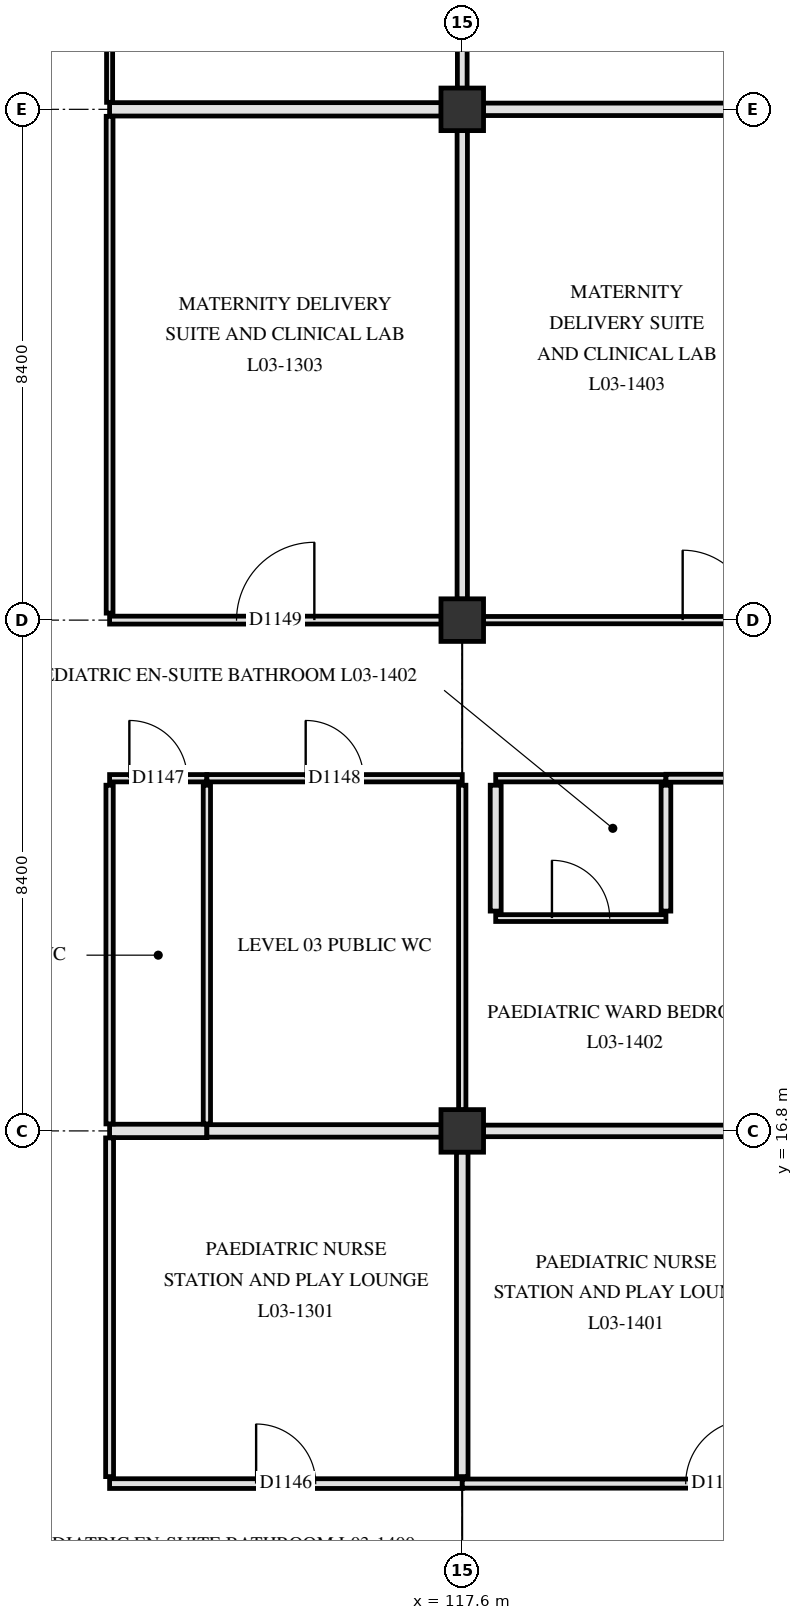
"""IFC4 building model, lengths in metres.
Left out: names, types, materials, properties, quantities, classifications, styles, units other than length and angle.
Written with IfcOpenShell. Run it as: python <this file> out.ifc"""

import sys

from ifc_helpers import new_model, si_unit, direction, frame, frame_2d, origin, origin_2d, place, context, subcontext, project, spatial, rectangle, extrude, element, fill, save


model = new_model("IFC4")
c1 = context("Model", 3, precision=1e-05, world=origin(), true_north=direction((0.0, 1.0)))
c2 = subcontext(c1, "Body", "Model", "MODEL_VIEW")
j1 = project(units=[si_unit("LENGTHUNIT", "METRE"), si_unit("PLANEANGLEUNIT", "RADIAN")], contexts=[c1])
p1 = place(None, origin())
s1 = spatial("IfcSite", under=j1, at=p1, CompositionType="ELEMENT")
p2 = place(p1, origin())
s2 = spatial("IfcBuilding", under=s1, at=p2, CompositionType="ELEMENT")
p3 = place(p2, frame((0.0, 0.0, 14.4)))
s3 = spatial("IfcBuildingStorey", under=s2, at=p3, CompositionType="ELEMENT", Elevation=14.4)
for number, where, z_axis, x_axis in (
    (1, (117.6, 16.8, 0.0), (0.0, 0.0, 1.0), (1.0, 0.0, 0.0)),
    (2, (117.6, 25.2, 0.0), (0.0, 0.0, 1.0), (1.0, 0.0, 0.0)),
    (3, (117.6, 33.6, 0.0), (0.0, 0.0, 1.0), (1.0, 0.0, 0.0)),
):
    element("IfcColumn", number, at=place(p3, frame(where, z_axis=z_axis, x_axis=x_axis)), inside=s3, PredefinedType="COLUMN", context=c2, shape_type="SweptSolid", body=[
        extrude(rectangle(XDim=0.7, YDim=0.7, at=origin_2d()), origin(), (0.0, 0.0, 1.0), 4.2),
    ])
p4 = place(p3, frame((111.8, 11.0, 0.0), z_axis=(0.0, 0.0, 1.0), x_axis=(1.0, 0.0, 0.0)))
e4 = element("IfcWall", 4, at=p4, inside=s3, PredefinedType="PARTITIONING", context=c2, shape_type="SweptSolid", body=[
    extrude(rectangle(XDim=5.8, YDim=0.16, at=frame_2d((2.9, 0.0))), origin(), (0.0, 0.0, 1.0), 3.34),
])
p5 = place(p4, frame((2.41, 0.0, 0.0)))
e5 = element("IfcOpeningElement", 5, at=p5, cuts=e4, PredefinedType="OPENING", context=c2, shape_type="SweptSolid", body=[
    extrude(rectangle(XDim=0.98, YDim=2.12, at=frame_2d((0.49, 1.06))), frame((0.0, 0.09, 0.0), z_axis=(0.0, -1.0, 0.0), x_axis=(1.0, 0.0, 0.0)), (0.0, 0.0, 1.0), 0.18),
])
p6 = place(p3, frame((117.6, 11.0, 0.0), z_axis=(0.0, 0.0, 1.0), x_axis=(1.0, 0.0, 0.0)))
e6 = element("IfcWall", 6, at=p6, inside=s3, PredefinedType="PARTITIONING", context=c2, shape_type="SweptSolid", body=[
    extrude(rectangle(XDim=8.4, YDim=0.15, at=frame_2d((4.2, 0.0))), origin(), (0.0, 0.0, 1.0), 2.69),
])
p7 = place(p6, frame((3.675, 0.0, 0.0)))
e7 = element("IfcOpeningElement", 7, at=p7, cuts=e6, PredefinedType="OPENING", context=c2, shape_type="SweptSolid", body=[
    extrude(rectangle(XDim=1.05, YDim=2.15, at=frame_2d((0.525, 1.075))), frame((0.0, 0.085, 0.0), z_axis=(0.0, -1.0, 0.0), x_axis=(1.0, 0.0, 0.0)), (0.0, 0.0, 1.0), 0.17),
])
p8 = place(p3, frame((111.8, 16.8, 0.0), z_axis=(0.0, 0.0, 1.0), x_axis=(1.0, 0.0, 0.0)))
e8 = element("IfcWall", 8, at=p8, inside=s3, PredefinedType="PARTITIONING", context=c2, shape_type="SweptSolid", body=[
    extrude(rectangle(XDim=1.6, YDim=0.22, at=frame_2d((0.8, 0.0))), origin(), (0.0, 0.0, 1.0), 3.29),
])
p9 = place(p3, frame((113.4, 16.8, 0.0), z_axis=(0.0, 0.0, 1.0), x_axis=(1.0, 0.0, 0.0)))
e9 = element("IfcWall", 9, at=p9, inside=s3, PredefinedType="PARTITIONING", context=c2, shape_type="SweptSolid", body=[
    extrude(rectangle(XDim=3.855, YDim=0.205, at=frame_2d((1.927, 0.0))), origin(), (0.0, 0.0, 1.0), 3.29),
])
p10 = place(p3, frame((117.945, 16.8, 0.0), z_axis=(0.0, 0.0, 1.0), x_axis=(1.0, 0.0, 0.0)))
e10 = element("IfcWall", 10, at=p10, inside=s3, PredefinedType="PARTITIONING", context=c2, shape_type="SweptSolid", body=[
    extrude(rectangle(XDim=7.71, YDim=0.19, at=frame_2d((3.855, 0.0))), origin(), (0.0, 0.0, 1.0), 3.29),
])
p11 = place(p3, frame((118.15, 20.3, 0.0), z_axis=(0.0, 0.0, 1.0), x_axis=(1.0, 0.0, 0.0)))
e11 = element("IfcWall", 11, at=p11, inside=s3, PredefinedType="PARTITIONING", context=c2, shape_type="SweptSolid", body=[
    extrude(rectangle(XDim=2.8, YDim=0.112, at=frame_2d((1.4, 0.0))), origin(), (0.0, 0.0, 1.0), 3.89),
])
p12 = place(p11, frame((0.925, 0.0, 0.0)))
e12 = element("IfcOpeningElement", 12, at=p12, cuts=e11, PredefinedType="OPENING", context=c2, shape_type="SweptSolid", body=[
    extrude(rectangle(XDim=0.95, YDim=2.1, at=frame_2d((0.475, 1.05))), frame((0.0, 0.066, 0.0), z_axis=(0.0, -1.0, 0.0), x_axis=(1.0, 0.0, 0.0)), (0.0, 0.0, 1.0), 0.132),
])
p13 = place(p3, frame((111.8, 22.6, 0.0), z_axis=(0.0, 0.0, 1.0), x_axis=(1.0, 0.0, 0.0)))
e13 = element("IfcWall", 13, at=p13, inside=s3, PredefinedType="PARTITIONING", context=c2, shape_type="SweptSolid", body=[
    extrude(rectangle(XDim=1.6, YDim=0.12, at=frame_2d((0.8, 0.0))), origin(), (0.0, 0.0, 1.0), 3.89),
])
p14 = place(p13, frame((0.325, 0.0, 0.0)))
e14 = element("IfcOpeningElement", 14, at=p14, cuts=e13, PredefinedType="OPENING", context=c2, shape_type="SweptSolid", body=[
    extrude(rectangle(XDim=0.95, YDim=2.1, at=frame_2d((0.475, 1.05))), frame((0.0, 0.07, 0.0), z_axis=(0.0, -1.0, 0.0), x_axis=(1.0, 0.0, 0.0)), (0.0, 0.0, 1.0), 0.14),
])
p15 = place(p3, frame((113.4, 22.6, 0.0), z_axis=(0.0, 0.0, 1.0), x_axis=(1.0, 0.0, 0.0)))
e15 = element("IfcWall", 15, at=p15, inside=s3, PredefinedType="PARTITIONING", context=c2, shape_type="SweptSolid", body=[
    extrude(rectangle(XDim=4.2, YDim=0.12, at=frame_2d((2.1, 0.0))), origin(), (0.0, 0.0, 1.0), 3.34),
])
p16 = place(p15, frame((1.625, 0.0, 0.0)))
e16 = element("IfcOpeningElement", 16, at=p16, cuts=e15, PredefinedType="OPENING", context=c2, shape_type="SweptSolid", body=[
    extrude(rectangle(XDim=0.95, YDim=2.1, at=frame_2d((0.475, 1.05))), frame((0.0, 0.07, 0.0), z_axis=(0.0, -1.0, 0.0), x_axis=(1.0, 0.0, 0.0)), (0.0, 0.0, 1.0), 0.14),
])
p17 = place(p3, frame((118.15, 22.6, 0.0), z_axis=(0.0, 0.0, 1.0), x_axis=(1.0, 0.0, 0.0)))
e17 = element("IfcWall", 17, at=p17, inside=s3, PredefinedType="PARTITIONING", context=c2, shape_type="SweptSolid", body=[
    extrude(rectangle(XDim=2.8, YDim=0.12, at=frame_2d((1.4, 0.0))), origin(), (0.0, 0.0, 1.0), 3.89),
])
p18 = place(p3, frame((120.95, 22.6, 0.0), z_axis=(0.0, 0.0, 1.0), x_axis=(1.0, 0.0, 0.0)))
e18 = element("IfcWall", 18, at=p18, inside=s3, PredefinedType="PARTITIONING", context=c2, shape_type="SweptSolid", body=[
    extrude(rectangle(XDim=5.05, YDim=0.13, at=frame_2d((2.525, 0.0))), origin(), (0.0, 0.0, 1.0), 2.69),
])
p19 = place(p18, frame((2.05, 0.0, 0.0)))
e19 = element("IfcOpeningElement", 19, at=p19, cuts=e18, PredefinedType="OPENING", context=c2, shape_type="SweptSolid", body=[
    extrude(rectangle(XDim=0.95, YDim=2.1, at=frame_2d((0.475, 1.05))), frame((0.0, 0.075, 0.0), z_axis=(0.0, -1.0, 0.0), x_axis=(1.0, 0.0, 0.0)), (0.0, 0.0, 1.0), 0.15),
])
p20 = place(p3, frame((111.8, 25.2, 0.0), z_axis=(0.0, 0.0, 1.0), x_axis=(1.0, 0.0, 0.0)))
e20 = element("IfcWall", 20, at=p20, inside=s3, PredefinedType="PARTITIONING", context=c2, shape_type="SweptSolid", body=[
    extrude(rectangle(XDim=5.455, YDim=0.13, at=frame_2d((2.728, 0.0))), origin(), (0.0, 0.0, 1.0), 2.89),
])
p21 = place(p20, frame((2.087, 0.0, 0.0)))
e21 = element("IfcOpeningElement", 21, at=p21, cuts=e20, PredefinedType="OPENING", context=c2, shape_type="SweptSolid", body=[
    extrude(rectangle(XDim=1.28, YDim=2.18, at=frame_2d((0.64, 1.09))), frame((0.0, 0.075, 0.0), z_axis=(0.0, -1.0, 0.0), x_axis=(1.0, 0.0, 0.0)), (0.0, 0.0, 1.0), 0.15),
])
p22 = place(p3, frame((117.945, 25.2, 0.0), z_axis=(0.0, 0.0, 1.0), x_axis=(1.0, 0.0, 0.0)))
e22 = element("IfcWall", 22, at=p22, inside=s3, PredefinedType="PARTITIONING", context=c2, shape_type="SweptSolid", body=[
    extrude(rectangle(XDim=7.71, YDim=0.12, at=frame_2d((3.855, 0.0))), origin(), (0.0, 0.0, 1.0), 2.89),
])
p23 = place(p22, frame((3.28, 0.0, 0.0)))
e23 = element("IfcOpeningElement", 23, at=p23, cuts=e22, PredefinedType="OPENING", context=c2, shape_type="SweptSolid", body=[
    extrude(rectangle(XDim=1.15, YDim=2.15, at=frame_2d((0.575, 1.075))), frame((0.0, 0.07, 0.0), z_axis=(0.0, -1.0, 0.0), x_axis=(1.0, 0.0, 0.0)), (0.0, 0.0, 1.0), 0.14),
])
p24 = place(p3, frame((111.8, 33.6, 0.0), z_axis=(0.0, 0.0, 1.0), x_axis=(1.0, 0.0, 0.0)))
e24 = element("IfcWall", 24, at=p24, inside=s3, PredefinedType="PARTITIONING", context=c2, shape_type="SweptSolid", body=[
    extrude(rectangle(XDim=5.455, YDim=0.22, at=frame_2d((2.728, 0.0))), origin(), (0.0, 0.0, 1.0), 3.29),
])
p25 = place(p3, frame((117.945, 33.6, 0.0), z_axis=(0.0, 0.0, 1.0), x_axis=(1.0, 0.0, 0.0)))
e25 = element("IfcWall", 25, at=p25, inside=s3, PredefinedType="PARTITIONING", context=c2, shape_type="SweptSolid", body=[
    extrude(rectangle(XDim=7.665, YDim=0.205, at=frame_2d((3.833, 0.0))), origin(), (0.0, 0.0, 1.0), 3.29),
])
p26 = place(p3, frame((111.8, 11.115, 0.0), z_axis=(0.0, 0.0, 1.0), x_axis=(0.0, 1.0, 0.0)))
e26 = element("IfcWall", 26, at=p26, inside=s3, PredefinedType="PARTITIONING", context=c2, shape_type="SweptSolid", body=[
    extrude(rectangle(XDim=5.57, YDim=0.13, at=frame_2d((2.785, 0.0))), origin(), (0.0, 0.0, 1.0), 3.29),
])
p27 = place(p3, frame((111.8, 16.915, 0.0), z_axis=(0.0, 0.0, 1.0), x_axis=(0.0, 1.0, 0.0)))
e27 = element("IfcWall", 27, at=p27, inside=s3, PredefinedType="PARTITIONING", context=c2, shape_type="SweptSolid", body=[
    extrude(rectangle(XDim=5.57, YDim=0.12, at=frame_2d((2.785, 0.0))), origin(), (0.0, 0.0, 1.0), 3.29),
])
p28 = place(p3, frame((111.8, 25.315, 0.0), z_axis=(0.0, 0.0, 1.0), x_axis=(0.0, 1.0, 0.0)))
e28 = element("IfcWall", 28, at=p28, inside=s3, PredefinedType="PARTITIONING", context=c2, shape_type="SweptSolid", body=[
    extrude(rectangle(XDim=8.17, YDim=0.112, at=frame_2d((4.085, 0.0))), origin(), (0.0, 0.0, 1.0), 2.89),
])
p29 = place(p3, frame((111.8, 33.715, 0.0), z_axis=(0.0, 0.0, 1.0), x_axis=(0.0, 1.0, 0.0)))
e29 = element("IfcWall", 29, at=p29, inside=s3, PredefinedType="PARTITIONING", context=c2, shape_type="SweptSolid", body=[
    extrude(rectangle(XDim=8.17, YDim=0.1, at=frame_2d((4.085, 0.0))), origin(), (0.0, 0.0, 1.0), 3.29),
])
p30 = place(p3, frame((113.4, 16.915, 0.0), z_axis=(0.0, 0.0, 1.0), x_axis=(0.0, 1.0, 0.0)))
e30 = element("IfcWall", 30, at=p30, inside=s3, PredefinedType="PARTITIONING", context=c2, shape_type="SweptSolid", body=[
    extrude(rectangle(XDim=5.57, YDim=0.12, at=frame_2d((2.785, 0.0))), origin(), (0.0, 0.0, 1.0), 3.29),
])
p31 = place(p3, frame((117.6, 11.115, 0.0), z_axis=(0.0, 0.0, 1.0), x_axis=(0.0, 1.0, 0.0)))
e31 = element("IfcWall", 31, at=p31, inside=s3, PredefinedType="PARTITIONING", context=c2, shape_type="SweptSolid", body=[
    extrude(rectangle(XDim=5.34, YDim=0.19, at=frame_2d((2.67, 0.0))), origin(), (0.0, 0.0, 1.0), 3.34),
])
p32 = place(p3, frame((117.6, 17.145, 0.0), z_axis=(0.0, 0.0, 1.0), x_axis=(0.0, 1.0, 0.0)))
e32 = element("IfcWall", 32, at=p32, inside=s3, PredefinedType="PARTITIONING", context=c2, shape_type="SweptSolid", body=[
    extrude(rectangle(XDim=5.34, YDim=0.12, at=frame_2d((2.67, 0.0))), origin(), (0.0, 0.0, 1.0), 3.34),
])
p33 = place(p3, frame((117.6, 25.545, 0.0), z_axis=(0.0, 0.0, 1.0), x_axis=(0.0, 1.0, 0.0)))
e33 = element("IfcWall", 33, at=p33, inside=s3, PredefinedType="PARTITIONING", context=c2, shape_type="SweptSolid", body=[
    extrude(rectangle(XDim=7.71, YDim=0.17, at=frame_2d((3.855, 0.0))), origin(), (0.0, 0.0, 1.0), 3.34),
])
p34 = place(p3, frame((117.6, 33.945, 0.0), z_axis=(0.0, 0.0, 1.0), x_axis=(0.0, 1.0, 0.0)))
e34 = element("IfcWall", 34, at=p34, inside=s3, PredefinedType="PARTITIONING", context=c2, shape_type="SweptSolid", body=[
    extrude(rectangle(XDim=7.71, YDim=0.16, at=frame_2d((3.855, 0.0))), origin(), (0.0, 0.0, 1.0), 3.34),
])
p35 = place(p3, frame((118.15, 20.415, 0.0), z_axis=(0.0, 0.0, 1.0), x_axis=(0.0, 1.0, 0.0)))
e35 = element("IfcWall", 35, at=p35, inside=s3, PredefinedType="PARTITIONING", context=c2, shape_type="SweptSolid", body=[
    extrude(rectangle(XDim=2.07, YDim=0.18, at=frame_2d((1.035, 0.0))), origin(), (0.0, 0.0, 1.0), 3.89),
])
p36 = place(p3, frame((120.95, 20.415, 0.0), z_axis=(0.0, 0.0, 1.0), x_axis=(0.0, 1.0, 0.0)))
e36 = element("IfcWall", 36, at=p36, inside=s3, PredefinedType="PARTITIONING", context=c2, shape_type="SweptSolid", body=[
    extrude(rectangle(XDim=2.07, YDim=0.16, at=frame_2d((1.035, 0.0))), origin(), (0.0, 0.0, 1.0), 3.89),
])
p37 = place(p5, origin())
e37 = element("IfcDoor", 37, at=p37, inside=s3, OperationType="SINGLE_SWING_LEFT", PredefinedType="DOOR", context=c2, shape_type="SweptSolid", body=[
    extrude(rectangle(XDim=0.98, YDim=2.12, at=frame_2d((0.49, 1.06))), frame((0.0, 0.025, 0.0), z_axis=(0.0, -1.0, 0.0), x_axis=(1.0, 0.0, 0.0)), (0.0, 0.0, 1.0), 0.05),
])
fill(e5, e37)
p38 = place(p14, origin())
e38 = element("IfcDoor", 38, at=p38, inside=s3, OperationType="SINGLE_SWING_LEFT", PredefinedType="DOOR", context=c2, shape_type="SweptSolid", body=[
    extrude(rectangle(XDim=0.95, YDim=2.1, at=frame_2d((0.475, 1.05))), frame((0.0, 0.025, 0.0), z_axis=(0.0, -1.0, 0.0), x_axis=(1.0, 0.0, 0.0)), (0.0, 0.0, 1.0), 0.05),
])
fill(e14, e38)
p39 = place(p16, origin())
e39 = element("IfcDoor", 39, at=p39, inside=s3, OperationType="SINGLE_SWING_LEFT", PredefinedType="DOOR", context=c2, shape_type="SweptSolid", body=[
    extrude(rectangle(XDim=0.95, YDim=2.1, at=frame_2d((0.475, 1.05))), frame((0.0, 0.025, 0.0), z_axis=(0.0, -1.0, 0.0), x_axis=(1.0, 0.0, 0.0)), (0.0, 0.0, 1.0), 0.05),
])
fill(e16, e39)
p40 = place(p21, origin())
e40 = element("IfcDoor", 40, at=p40, inside=s3, OperationType="SINGLE_SWING_RIGHT", PredefinedType="DOOR", context=c2, shape_type="SweptSolid", body=[
    extrude(rectangle(XDim=1.28, YDim=2.18, at=frame_2d((0.64, 1.09))), frame((0.0, 0.025, 0.0), z_axis=(0.0, -1.0, 0.0), x_axis=(1.0, 0.0, 0.0)), (0.0, 0.0, 1.0), 0.05),
])
fill(e21, e40)
p41 = place(p7, origin())
e41 = element("IfcDoor", 41, at=p41, inside=s3, OperationType="SINGLE_SWING_RIGHT", PredefinedType="DOOR", context=c2, shape_type="SweptSolid", body=[
    extrude(rectangle(XDim=1.05, YDim=2.15, at=frame_2d((0.525, 1.075))), frame((0.0, 0.025, 0.0), z_axis=(0.0, -1.0, 0.0), x_axis=(1.0, 0.0, 0.0)), (0.0, 0.0, 1.0), 0.05),
])
fill(e7, e41)
p42 = place(p12, origin())
e42 = element("IfcDoor", 42, at=p42, inside=s3, OperationType="SINGLE_SWING_LEFT", PredefinedType="DOOR", context=c2, shape_type="SweptSolid", body=[
    extrude(rectangle(XDim=0.95, YDim=2.1, at=frame_2d((0.475, 1.05))), frame((0.0, 0.025, 0.0), z_axis=(0.0, -1.0, 0.0), x_axis=(1.0, 0.0, 0.0)), (0.0, 0.0, 1.0), 0.05),
])
fill(e12, e42)
p43 = place(p23, origin())
e43 = element("IfcDoor", 43, at=p43, inside=s3, OperationType="SINGLE_SWING_LEFT", PredefinedType="DOOR", context=c2, shape_type="SweptSolid", body=[
    extrude(rectangle(XDim=1.15, YDim=2.15, at=frame_2d((0.575, 1.075))), frame((0.0, 0.025, 0.0), z_axis=(0.0, -1.0, 0.0), x_axis=(1.0, 0.0, 0.0)), (0.0, 0.0, 1.0), 0.05),
])
fill(e23, e43)
save(model, sys.argv[1])
